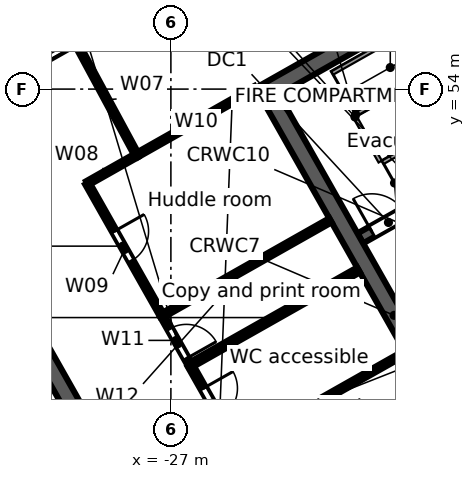
"""IFC4 building model, lengths in metres.
Left out: names, types, materials, properties, quantities, classifications, styles, units other than length and angle.
Written with IfcOpenShell. Run it as: python <this file> out.ifc"""

import sys

from ifc_helpers import new_model, si_unit, direction, frame, frame_2d, origin, place, context, subcontext, project, spatial, rectangle, extrude, element, fill, save


model = new_model("IFC4")
c1 = context("Model", 3, precision=1e-05, world=origin(), true_north=direction((0.0, 1.0)))
c2 = subcontext(c1, "Body", "Model", "MODEL_VIEW")
j1 = project(units=[si_unit("LENGTHUNIT", "METRE"), si_unit("PLANEANGLEUNIT", "RADIAN")], contexts=[c1])
p1 = place(None, origin())
s1 = spatial("IfcSite", under=j1, at=p1, CompositionType="ELEMENT")
p2 = place(p1, origin())
s2 = spatial("IfcBuilding", under=s1, at=p2, CompositionType="ELEMENT")
p3 = place(p2, frame((0.0, 0.0, 223.1)))
s3 = spatial("IfcBuildingStorey", under=s2, at=p3, CompositionType="ELEMENT", Elevation=223.1)
p4 = place(p3, frame((-0.046, 47.974, 0.0), z_axis=(0.0, 0.0, 1.0), x_axis=(-0.870356579543, -0.492421998337, 0.0)))
e1 = element("IfcWall", 1, at=p4, inside=s3, PredefinedType="STANDARD", context=c2, shape_type="SweptSolid", body=[
    extrude(rectangle(XDim=43.754, YDim=0.25, at=frame_2d((21.877, 0.0))), origin(), (0.0, 0.0, 1.0), 3.62),
])
p5 = place(p4, frame((41.061, 0.0, 0.8)))
e2 = element("IfcOpeningElement", 2, at=p5, cuts=e1, PredefinedType="OPENING", context=c2, shape_type="SweptSolid", body=[
    extrude(rectangle(XDim=2.4, YDim=2.2, at=frame_2d((1.2, 1.1))), frame((0.0, 0.135, 0.0), z_axis=(0.0, -1.0, 0.0), x_axis=(1.0, 0.0, 0.0)), (0.0, 0.0, 1.0), 0.27),
])
p6 = place(p4, frame((38.443, 0.0, 0.0)))
e3 = element("IfcOpeningElement", 3, at=p6, cuts=e1, PredefinedType="OPENING", context=c2, shape_type="SweptSolid", body=[
    extrude(rectangle(XDim=1.8, YDim=2.4, at=frame_2d((0.9, 1.2))), frame((0.0, 0.135, 0.0), z_axis=(0.0, -1.0, 0.0), x_axis=(1.0, 0.0, 0.0)), (0.0, 0.0, 1.0), 0.27),
])
p7 = place(p4, frame((35.225, 0.0, 0.8)))
e4 = element("IfcOpeningElement", 4, at=p7, cuts=e1, PredefinedType="OPENING", context=c2, shape_type="SweptSolid", body=[
    extrude(rectangle(XDim=2.4, YDim=2.2, at=frame_2d((1.2, 1.1))), frame((0.0, 0.135, 0.0), z_axis=(0.0, -1.0, 0.0), x_axis=(1.0, 0.0, 0.0)), (0.0, 0.0, 1.0), 0.27),
])
p8 = place(p4, frame((32.307, 0.0, 0.8)))
e5 = element("IfcOpeningElement", 5, at=p8, cuts=e1, PredefinedType="OPENING", context=c2, shape_type="SweptSolid", body=[
    extrude(rectangle(XDim=2.4, YDim=2.2, at=frame_2d((1.2, 1.1))), frame((0.0, 0.135, 0.0), z_axis=(0.0, -1.0, 0.0), x_axis=(1.0, 0.0, 0.0)), (0.0, 0.0, 1.0), 0.27),
])
p9 = place(p4, frame((29.688, 0.0, 0.0)))
e6 = element("IfcOpeningElement", 6, at=p9, cuts=e1, PredefinedType="OPENING", context=c2, shape_type="SweptSolid", body=[
    extrude(rectangle(XDim=1.8, YDim=2.4, at=frame_2d((0.9, 1.2))), frame((0.0, 0.135, 0.0), z_axis=(0.0, -1.0, 0.0), x_axis=(1.0, 0.0, 0.0)), (0.0, 0.0, 1.0), 0.27),
])
p10 = place(p4, frame((26.47, 0.0, 0.8)))
e7 = element("IfcOpeningElement", 7, at=p10, cuts=e1, PredefinedType="OPENING", context=c2, shape_type="SweptSolid", body=[
    extrude(rectangle(XDim=2.4, YDim=2.2, at=frame_2d((1.2, 1.1))), frame((0.0, 0.135, 0.0), z_axis=(0.0, -1.0, 0.0), x_axis=(1.0, 0.0, 0.0)), (0.0, 0.0, 1.0), 0.27),
])
p11 = place(p4, frame((23.552, 0.0, 0.8)))
e8 = element("IfcOpeningElement", 8, at=p11, cuts=e1, PredefinedType="OPENING", context=c2, shape_type="SweptSolid", body=[
    extrude(rectangle(XDim=2.4, YDim=2.2, at=frame_2d((1.2, 1.1))), frame((0.0, 0.135, 0.0), z_axis=(0.0, -1.0, 0.0), x_axis=(1.0, 0.0, 0.0)), (0.0, 0.0, 1.0), 0.27),
])
p12 = place(p4, frame((20.934, 0.0, 0.0)))
e9 = element("IfcOpeningElement", 9, at=p12, cuts=e1, PredefinedType="OPENING", context=c2, shape_type="SweptSolid", body=[
    extrude(rectangle(XDim=1.8, YDim=2.4, at=frame_2d((0.9, 1.2))), frame((0.0, 0.135, 0.0), z_axis=(0.0, -1.0, 0.0), x_axis=(1.0, 0.0, 0.0)), (0.0, 0.0, 1.0), 0.27),
])
p13 = place(p4, frame((17.716, 0.0, 0.8)))
e10 = element("IfcOpeningElement", 10, at=p13, cuts=e1, PredefinedType="OPENING", context=c2, shape_type="SweptSolid", body=[
    extrude(rectangle(XDim=2.4, YDim=2.2, at=frame_2d((1.2, 1.1))), frame((0.0, 0.135, 0.0), z_axis=(0.0, -1.0, 0.0), x_axis=(1.0, 0.0, 0.0)), (0.0, 0.0, 1.0), 0.27),
])
p14 = place(p4, frame((14.798, 0.0, 0.8)))
e11 = element("IfcOpeningElement", 11, at=p14, cuts=e1, PredefinedType="OPENING", context=c2, shape_type="SweptSolid", body=[
    extrude(rectangle(XDim=2.4, YDim=2.2, at=frame_2d((1.2, 1.1))), frame((0.0, 0.135, 0.0), z_axis=(0.0, -1.0, 0.0), x_axis=(1.0, 0.0, 0.0)), (0.0, 0.0, 1.0), 0.27),
])
p15 = place(p4, frame((12.179, 0.0, 0.0)))
e12 = element("IfcOpeningElement", 12, at=p15, cuts=e1, PredefinedType="OPENING", context=c2, shape_type="SweptSolid", body=[
    extrude(rectangle(XDim=1.8, YDim=2.4, at=frame_2d((0.9, 1.2))), frame((0.0, 0.135, 0.0), z_axis=(0.0, -1.0, 0.0), x_axis=(1.0, 0.0, 0.0)), (0.0, 0.0, 1.0), 0.27),
])
p16 = place(p4, frame((8.961, 0.0, 0.8)))
e13 = element("IfcOpeningElement", 13, at=p16, cuts=e1, PredefinedType="OPENING", context=c2, shape_type="SweptSolid", body=[
    extrude(rectangle(XDim=2.4, YDim=2.2, at=frame_2d((1.2, 1.1))), frame((0.0, 0.135, 0.0), z_axis=(0.0, -1.0, 0.0), x_axis=(1.0, 0.0, 0.0)), (0.0, 0.0, 1.0), 0.27),
])
p17 = place(p4, frame((6.043, 0.0, 0.8)))
e14 = element("IfcOpeningElement", 14, at=p17, cuts=e1, PredefinedType="OPENING", context=c2, shape_type="SweptSolid", body=[
    extrude(rectangle(XDim=2.4, YDim=2.2, at=frame_2d((1.2, 1.1))), frame((0.0, 0.135, 0.0), z_axis=(0.0, -1.0, 0.0), x_axis=(1.0, 0.0, 0.0)), (0.0, 0.0, 1.0), 0.27),
])
p18 = place(p4, frame((3.425, 0.0, 0.0)))
e15 = element("IfcOpeningElement", 15, at=p18, cuts=e1, PredefinedType="OPENING", context=c2, shape_type="SweptSolid", body=[
    extrude(rectangle(XDim=1.8, YDim=2.4, at=frame_2d((0.9, 1.2))), frame((0.0, 0.135, 0.0), z_axis=(0.0, -1.0, 0.0), x_axis=(1.0, 0.0, 0.0)), (0.0, 0.0, 1.0), 0.27),
])
p19 = place(p4, frame((0.207, 0.0, 0.8)))
e16 = element("IfcOpeningElement", 16, at=p19, cuts=e1, PredefinedType="OPENING", context=c2, shape_type="SweptSolid", body=[
    extrude(rectangle(XDim=2.4, YDim=2.2, at=frame_2d((1.2, 1.1))), frame((0.0, 0.135, 0.0), z_axis=(0.0, -1.0, 0.0), x_axis=(1.0, 0.0, 0.0)), (0.0, 0.0, 1.0), 0.27),
])
p20 = place(p3, frame((-58.732, 38.771, 0.0), z_axis=(0.0, 0.0, 1.0), x_axis=(0.870354824205, 0.492425100887, 0.0)))
e17 = element("IfcWall", 17, at=p20, inside=s3, PredefinedType="STANDARD", context=c2, shape_type="SweptSolid", body=[
    extrude(rectangle(XDim=64.006, YDim=0.25, at=frame_2d((32.003, 0.0))), origin(), (0.0, 0.0, 1.0), 3.62),
])
p21 = place(p20, frame((61.259, 0.0, 0.8)))
e18 = element("IfcOpeningElement", 18, at=p21, cuts=e17, PredefinedType="OPENING", context=c2, shape_type="SweptSolid", body=[
    extrude(rectangle(XDim=2.4, YDim=2.2, at=frame_2d((1.2, 1.1))), frame((0.0, 0.135, 0.0), z_axis=(0.0, -1.0, 0.0), x_axis=(1.0, 0.0, 0.0)), (0.0, 0.0, 1.0), 0.27),
])
p22 = place(p20, frame((58.216, 0.0, 0.8)))
e19 = element("IfcOpeningElement", 19, at=p22, cuts=e17, PredefinedType="OPENING", context=c2, shape_type="SweptSolid", body=[
    extrude(rectangle(XDim=2.4, YDim=2.2, at=frame_2d((1.2, 1.1))), frame((0.0, 0.135, 0.0), z_axis=(0.0, -1.0, 0.0), x_axis=(1.0, 0.0, 0.0)), (0.0, 0.0, 1.0), 0.27),
])
p23 = place(p20, frame((55.173, 0.0, 0.8)))
e20 = element("IfcOpeningElement", 20, at=p23, cuts=e17, PredefinedType="OPENING", context=c2, shape_type="SweptSolid", body=[
    extrude(rectangle(XDim=2.4, YDim=2.2, at=frame_2d((1.2, 1.1))), frame((0.0, 0.135, 0.0), z_axis=(0.0, -1.0, 0.0), x_axis=(1.0, 0.0, 0.0)), (0.0, 0.0, 1.0), 0.27),
])
p24 = place(p20, frame((52.129, 0.0, 0.8)))
e21 = element("IfcOpeningElement", 21, at=p24, cuts=e17, PredefinedType="OPENING", context=c2, shape_type="SweptSolid", body=[
    extrude(rectangle(XDim=2.4, YDim=2.2, at=frame_2d((1.2, 1.1))), frame((0.0, 0.135, 0.0), z_axis=(0.0, -1.0, 0.0), x_axis=(1.0, 0.0, 0.0)), (0.0, 0.0, 1.0), 0.27),
])
p25 = place(p20, frame((49.086, 0.0, 0.8)))
e22 = element("IfcOpeningElement", 22, at=p25, cuts=e17, PredefinedType="OPENING", context=c2, shape_type="SweptSolid", body=[
    extrude(rectangle(XDim=2.4, YDim=2.2, at=frame_2d((1.2, 1.1))), frame((0.0, 0.135, 0.0), z_axis=(0.0, -1.0, 0.0), x_axis=(1.0, 0.0, 0.0)), (0.0, 0.0, 1.0), 0.27),
])
p26 = place(p20, frame((46.043, 0.0, 0.8)))
e23 = element("IfcOpeningElement", 23, at=p26, cuts=e17, PredefinedType="OPENING", context=c2, shape_type="SweptSolid", body=[
    extrude(rectangle(XDim=2.4, YDim=2.2, at=frame_2d((1.2, 1.1))), frame((0.0, 0.135, 0.0), z_axis=(0.0, -1.0, 0.0), x_axis=(1.0, 0.0, 0.0)), (0.0, 0.0, 1.0), 0.27),
])
p27 = place(p20, frame((43.0, 0.0, 0.8)))
e24 = element("IfcOpeningElement", 24, at=p27, cuts=e17, PredefinedType="OPENING", context=c2, shape_type="SweptSolid", body=[
    extrude(rectangle(XDim=2.4, YDim=2.2, at=frame_2d((1.2, 1.1))), frame((0.0, 0.135, 0.0), z_axis=(0.0, -1.0, 0.0), x_axis=(1.0, 0.0, 0.0)), (0.0, 0.0, 1.0), 0.27),
])
p28 = place(p20, frame((39.956, 0.0, 0.8)))
e25 = element("IfcOpeningElement", 25, at=p28, cuts=e17, PredefinedType="OPENING", context=c2, shape_type="SweptSolid", body=[
    extrude(rectangle(XDim=2.4, YDim=2.2, at=frame_2d((1.2, 1.1))), frame((0.0, 0.135, 0.0), z_axis=(0.0, -1.0, 0.0), x_axis=(1.0, 0.0, 0.0)), (0.0, 0.0, 1.0), 0.27),
])
p29 = place(p20, frame((36.913, 0.0, 0.8)))
e26 = element("IfcOpeningElement", 26, at=p29, cuts=e17, PredefinedType="OPENING", context=c2, shape_type="SweptSolid", body=[
    extrude(rectangle(XDim=2.4, YDim=2.2, at=frame_2d((1.2, 1.1))), frame((0.0, 0.135, 0.0), z_axis=(0.0, -1.0, 0.0), x_axis=(1.0, 0.0, 0.0)), (0.0, 0.0, 1.0), 0.27),
])
p30 = place(p20, frame((33.87, 0.0, 0.8)))
e27 = element("IfcOpeningElement", 27, at=p30, cuts=e17, PredefinedType="OPENING", context=c2, shape_type="SweptSolid", body=[
    extrude(rectangle(XDim=2.4, YDim=2.2, at=frame_2d((1.2, 1.1))), frame((0.0, 0.135, 0.0), z_axis=(0.0, -1.0, 0.0), x_axis=(1.0, 0.0, 0.0)), (0.0, 0.0, 1.0), 0.27),
])
p31 = place(p20, frame((30.826, 0.0, 0.8)))
e28 = element("IfcOpeningElement", 28, at=p31, cuts=e17, PredefinedType="OPENING", context=c2, shape_type="SweptSolid", body=[
    extrude(rectangle(XDim=2.4, YDim=2.2, at=frame_2d((1.2, 1.1))), frame((0.0, 0.135, 0.0), z_axis=(0.0, -1.0, 0.0), x_axis=(1.0, 0.0, 0.0)), (0.0, 0.0, 1.0), 0.27),
])
p32 = place(p20, frame((27.783, 0.0, 0.8)))
e29 = element("IfcOpeningElement", 29, at=p32, cuts=e17, PredefinedType="OPENING", context=c2, shape_type="SweptSolid", body=[
    extrude(rectangle(XDim=2.4, YDim=2.2, at=frame_2d((1.2, 1.1))), frame((0.0, 0.135, 0.0), z_axis=(0.0, -1.0, 0.0), x_axis=(1.0, 0.0, 0.0)), (0.0, 0.0, 1.0), 0.27),
])
p33 = place(p20, frame((24.74, 0.0, 0.8)))
e30 = element("IfcOpeningElement", 30, at=p33, cuts=e17, PredefinedType="OPENING", context=c2, shape_type="SweptSolid", body=[
    extrude(rectangle(XDim=2.4, YDim=2.2, at=frame_2d((1.2, 1.1))), frame((0.0, 0.135, 0.0), z_axis=(0.0, -1.0, 0.0), x_axis=(1.0, 0.0, 0.0)), (0.0, 0.0, 1.0), 0.27),
])
p34 = place(p20, frame((21.696, 0.0, 0.8)))
e31 = element("IfcOpeningElement", 31, at=p34, cuts=e17, PredefinedType="OPENING", context=c2, shape_type="SweptSolid", body=[
    extrude(rectangle(XDim=2.4, YDim=2.2, at=frame_2d((1.2, 1.1))), frame((0.0, 0.135, 0.0), z_axis=(0.0, -1.0, 0.0), x_axis=(1.0, 0.0, 0.0)), (0.0, 0.0, 1.0), 0.27),
])
p35 = place(p20, frame((18.653, 0.0, 0.8)))
e32 = element("IfcOpeningElement", 32, at=p35, cuts=e17, PredefinedType="OPENING", context=c2, shape_type="SweptSolid", body=[
    extrude(rectangle(XDim=2.4, YDim=2.2, at=frame_2d((1.2, 1.1))), frame((0.0, 0.135, 0.0), z_axis=(0.0, -1.0, 0.0), x_axis=(1.0, 0.0, 0.0)), (0.0, 0.0, 1.0), 0.27),
])
p36 = place(p20, frame((15.61, 0.0, 0.8)))
e33 = element("IfcOpeningElement", 33, at=p36, cuts=e17, PredefinedType="OPENING", context=c2, shape_type="SweptSolid", body=[
    extrude(rectangle(XDim=2.4, YDim=2.2, at=frame_2d((1.2, 1.1))), frame((0.0, 0.135, 0.0), z_axis=(0.0, -1.0, 0.0), x_axis=(1.0, 0.0, 0.0)), (0.0, 0.0, 1.0), 0.27),
])
p37 = place(p20, frame((12.567, 0.0, 0.8)))
e34 = element("IfcOpeningElement", 34, at=p37, cuts=e17, PredefinedType="OPENING", context=c2, shape_type="SweptSolid", body=[
    extrude(rectangle(XDim=2.4, YDim=2.2, at=frame_2d((1.2, 1.1))), frame((0.0, 0.135, 0.0), z_axis=(0.0, -1.0, 0.0), x_axis=(1.0, 0.0, 0.0)), (0.0, 0.0, 1.0), 0.27),
])
p38 = place(p20, frame((9.523, 0.0, 0.8)))
e35 = element("IfcOpeningElement", 35, at=p38, cuts=e17, PredefinedType="OPENING", context=c2, shape_type="SweptSolid", body=[
    extrude(rectangle(XDim=2.4, YDim=2.2, at=frame_2d((1.2, 1.1))), frame((0.0, 0.135, 0.0), z_axis=(0.0, -1.0, 0.0), x_axis=(1.0, 0.0, 0.0)), (0.0, 0.0, 1.0), 0.27),
])
p39 = place(p20, frame((6.48, 0.0, 0.8)))
e36 = element("IfcOpeningElement", 36, at=p39, cuts=e17, PredefinedType="OPENING", context=c2, shape_type="SweptSolid", body=[
    extrude(rectangle(XDim=2.4, YDim=2.2, at=frame_2d((1.2, 1.1))), frame((0.0, 0.135, 0.0), z_axis=(0.0, -1.0, 0.0), x_axis=(1.0, 0.0, 0.0)), (0.0, 0.0, 1.0), 0.27),
])
p40 = place(p20, frame((3.437, 0.0, 0.8)))
e37 = element("IfcOpeningElement", 37, at=p40, cuts=e17, PredefinedType="OPENING", context=c2, shape_type="SweptSolid", body=[
    extrude(rectangle(XDim=2.4, YDim=2.2, at=frame_2d((1.2, 1.1))), frame((0.0, 0.135, 0.0), z_axis=(0.0, -1.0, 0.0), x_axis=(1.0, 0.0, 0.0)), (0.0, 0.0, 1.0), 0.27),
])
p41 = place(p20, frame((0.393, 0.0, 0.8)))
e38 = element("IfcOpeningElement", 38, at=p41, cuts=e17, PredefinedType="OPENING", context=c2, shape_type="SweptSolid", body=[
    extrude(rectangle(XDim=2.4, YDim=2.2, at=frame_2d((1.2, 1.1))), frame((0.0, 0.135, 0.0), z_axis=(0.0, -1.0, 0.0), x_axis=(1.0, 0.0, 0.0)), (0.0, 0.0, 1.0), 0.27),
])
p42 = place(p3, frame((-31.787, 49.542, 0.0), z_axis=(0.0, 0.0, 1.0), x_axis=(0.492421378713, -0.870356930107, 0.0)))
e39 = element("IfcWall", 39, at=p42, inside=s3, PredefinedType="SOLIDWALL", context=c2, shape_type="SweptSolid", body=[
    extrude(rectangle(XDim=13.1, YDim=0.45, at=frame_2d((6.55, 0.0))), origin(), (0.0, 0.0, 1.0), 3.62),
])
p43 = place(p3, frame((-22.015, 50.072, 0.0), z_axis=(0.0, 0.0, 1.0), x_axis=(0.870354900257, 0.492424966466, 0.0)))
e40 = element("IfcWall", 40, at=p43, inside=s3, PredefinedType="SOLIDWALL", context=c2, shape_type="SweptSolid", body=[
    extrude(rectangle(XDim=7.35, YDim=0.3, at=frame_2d((3.675, 0.0))), origin(), (0.0, 0.0, 1.0), 3.62),
])
p44 = place(p43, frame((0.35, 0.0, 0.0)))
e41 = element("IfcOpeningElement", 41, at=p44, cuts=e40, PredefinedType="OPENING", context=c2, shape_type="SweptSolid", body=[
    extrude(rectangle(XDim=1.0, YDim=2.1, at=frame_2d((0.5, 1.05))), frame((0.0, 0.16, 0.0), z_axis=(0.0, -1.0, 0.0), x_axis=(1.0, 0.0, 0.0)), (0.0, 0.0, 1.0), 0.32),
])
p45 = place(p3, frame((-24.66, 53.832, 0.0), z_axis=(0.0, 0.0, 1.0), x_axis=(0.870353598469, 0.492427267353, 0.0)))
e42 = element("IfcWall", 42, at=p45, inside=s3, PredefinedType="SOLIDWALL", context=c2, shape_type="SweptSolid", body=[
    extrude(rectangle(XDim=15.0, YDim=0.45, at=frame_2d((7.5, 0.0))), origin(), (0.0, 0.0, 1.0), 3.62),
])
p46 = place(p3, frame((-24.353, 53.747, 0.0), z_axis=(0.0, 0.0, 1.0), x_axis=(0.492435496286, -0.870348942665, 0.0)))
e43 = element("IfcWall", 43, at=p46, inside=s3, PredefinedType="SOLIDWALL", context=c2, shape_type="SweptSolid", body=[
    extrude(rectangle(XDim=13.1, YDim=0.45, at=frame_2d((6.55, 0.0))), origin(), (0.0, 0.0, 1.0), 3.62),
])
p47 = place(p3, frame((-29.474, 55.181, 0.0), z_axis=(0.0, 0.0, 1.0), x_axis=(0.475344759365, -0.879799613403, 0.0)))
e44 = element("IfcWall", 44, at=p47, inside=s3, PredefinedType="PARTITIONING", context=c2, shape_type="SweptSolid", body=[
    extrude(rectangle(XDim=3.32, YDim=0.125, at=frame_2d((1.66, 0.0))), origin(), (0.0, 0.0, 1.0), 2.988),
])
p48 = place(p3, frame((-29.201, 51.521, 0.0), z_axis=(0.0, 0.0, 1.0), x_axis=(0.870150176056, 0.492786638526, 0.0)))
e45 = element("IfcWall", 45, at=p48, inside=s3, PredefinedType="PARTITIONING", context=c2, shape_type="SweptSolid", body=[
    extrude(rectangle(XDim=1.5, YDim=0.125, at=frame_2d((0.75, 0.0))), origin(), (0.0, 0.0, 1.0), 3.62),
])
p49 = place(p3, frame((-29.201, 51.521, 0.0), z_axis=(0.0, 0.0, 1.0), x_axis=(0.492340861121, -0.870402479587, 0.0)))
e46 = element("IfcWall", 46, at=p49, inside=s3, PredefinedType="PARTITIONING", context=c2, shape_type="SweptSolid", body=[
    extrude(rectangle(XDim=3.999, YDim=0.125, at=frame_2d((2.0, 0.0))), origin(), (0.0, 0.0, 1.0), 3.62),
])
p50 = place(p49, frame((1.45, 0.0, 0.0)))
e47 = element("IfcOpeningElement", 47, at=p50, cuts=e46, PredefinedType="OPENING", context=c2, shape_type="SweptSolid", body=[
    extrude(rectangle(XDim=0.9, YDim=2.1, at=frame_2d((0.45, 1.05))), frame((0.0, 0.073, 0.0), z_axis=(0.0, -1.0, 0.0), x_axis=(1.0, 0.0, 0.0)), (0.0, 0.0, 1.0), 0.145),
])
p51 = place(p3, frame((-27.896, 52.26, 0.0), z_axis=(0.0, 0.0, 1.0), x_axis=(0.870352535776, 0.492429145632, 0.0)))
e48 = element("IfcWall", 48, at=p51, inside=s3, PredefinedType="PARTITIONING", context=c2, shape_type="SweptSolid", body=[
    extrude(rectangle(XDim=3.591, YDim=0.125, at=frame_2d((1.795, 0.0))), origin(), (0.0, 0.0, 1.0), 2.892),
])
p52 = place(p3, frame((-27.232, 48.04, 0.0), z_axis=(0.0, 0.0, 1.0), x_axis=(0.492437810475, -0.870347633314, 0.0)))
e49 = element("IfcWall", 49, at=p52, inside=s3, PredefinedType="PARTITIONING", context=c2, shape_type="SweptSolid", body=[
    extrude(rectangle(XDim=1.501, YDim=0.125, at=frame_2d((0.75, 0.0))), origin(), (0.0, 0.0, 1.0), 3.62),
])
p53 = place(p52, frame((0.4, 0.0, 0.0)))
e50 = element("IfcOpeningElement", 50, at=p53, cuts=e49, PredefinedType="OPENING", context=c2, shape_type="SweptSolid", body=[
    extrude(rectangle(XDim=0.9, YDim=2.1, at=frame_2d((0.45, 1.05))), frame((0.0, 0.073, 0.0), z_axis=(0.0, -1.0, 0.0), x_axis=(1.0, 0.0, 0.0)), (0.0, 0.0, 1.0), 0.145),
])
p54 = place(p3, frame((-27.232, 48.04, 0.0), z_axis=(0.0, 0.0, 1.0), x_axis=(0.870339461844, 0.492452252668, 0.0)))
e51 = element("IfcWall", 51, at=p54, inside=s3, PredefinedType="PARTITIONING", context=c2, shape_type="SweptSolid", body=[
    extrude(rectangle(XDim=5.091, YDim=0.125, at=frame_2d((2.545, 0.0))), origin(), (0.0, 0.0, 1.0), 2.892),
])
p55 = place(p3, frame((-26.493, 46.734, 0.0), z_axis=(0.0, 0.0, 1.0), x_axis=(0.49257867544, -0.870267917656, 0.0)))
e52 = element("IfcWall", 52, at=p55, inside=s3, PredefinedType="PARTITIONING", context=c2, shape_type="SweptSolid", body=[
    extrude(rectangle(XDim=2.499, YDim=0.15, at=frame_2d((1.25, 0.0))), origin(), (0.0, 0.0, 1.0), 2.892),
])
p56 = place(p55, frame((0.7, 0.0, 0.0)))
e53 = element("IfcOpeningElement", 53, at=p56, cuts=e52, PredefinedType="OPENING", context=c2, shape_type="SweptSolid", body=[
    extrude(rectangle(XDim=0.9, YDim=2.1, at=frame_2d((0.45, 1.05))), frame((0.0, 0.085, 0.0), z_axis=(0.0, -1.0, 0.0), x_axis=(1.0, 0.0, 0.0)), (0.0, 0.0, 1.0), 0.17),
])
p57 = place(p3, frame((-26.493, 46.734, 0.0), z_axis=(0.0, 0.0, 1.0), x_axis=(0.870339461844, 0.492452252668, 0.0)))
e54 = element("IfcWall", 54, at=p57, inside=s3, PredefinedType="PARTITIONING", context=c2, shape_type="SweptSolid", body=[
    extrude(rectangle(XDim=5.091, YDim=0.15, at=frame_2d((2.545, 0.0))), origin(), (0.0, 0.0, 1.0), 2.892),
])
p58 = place(p3, frame((-25.262, 44.559, 0.0), z_axis=(0.0, 0.0, 1.0), x_axis=(0.870442223229, 0.492270592276, 0.0)))
e55 = element("IfcWall", 55, at=p58, inside=s3, PredefinedType="PARTITIONING", context=c2, shape_type="SweptSolid", body=[
    extrude(rectangle(XDim=5.09, YDim=0.125, at=frame_2d((2.545, 0.0))), origin(), (0.0, 0.0, 1.0), 3.62),
])
p59 = place(p31, origin())
e56 = element("IfcWindow", 56, at=p59, inside=s3, PartitioningType="SINGLE_PANEL", PredefinedType="WINDOW", context=c2, shape_type="SweptSolid", body=[
    extrude(rectangle(XDim=2.4, YDim=2.2, at=frame_2d((1.2, 1.1))), frame((0.0, 0.03, 0.0), z_axis=(0.0, -1.0, 0.0), x_axis=(1.0, 0.0, 0.0)), (0.0, 0.0, 1.0), 0.06),
])
fill(e28, e56)
p60 = place(p44, origin())
e57 = element("IfcDoor", 57, at=p60, inside=s3, OperationType="SINGLE_SWING_LEFT", PredefinedType="DOOR", context=c2, shape_type="SweptSolid", body=[
    extrude(rectangle(XDim=1.0, YDim=2.1, at=frame_2d((0.5, 1.05))), frame((0.0, 0.025, 0.0), z_axis=(0.0, -1.0, 0.0), x_axis=(1.0, 0.0, 0.0)), (0.0, 0.0, 1.0), 0.05),
])
fill(e41, e57)
p61 = place(p50, origin())
e58 = element("IfcDoor", 58, at=p61, inside=s3, OperationType="SINGLE_SWING_LEFT", PredefinedType="DOOR", context=c2, shape_type="SweptSolid", body=[
    extrude(rectangle(XDim=0.9, YDim=2.1, at=frame_2d((0.45, 1.05))), frame((0.0, 0.025, 0.0), z_axis=(0.0, -1.0, 0.0), x_axis=(1.0, 0.0, 0.0)), (0.0, 0.0, 1.0), 0.05),
])
fill(e47, e58)
p62 = place(p56, origin())
e59 = element("IfcDoor", 59, at=p62, inside=s3, OperationType="SINGLE_SWING_LEFT", PredefinedType="DOOR", context=c2, shape_type="SweptSolid", body=[
    extrude(rectangle(XDim=0.9, YDim=2.1, at=frame_2d((0.45, 1.05))), frame((0.0, 0.025, 0.0), z_axis=(0.0, -1.0, 0.0), x_axis=(1.0, 0.0, 0.0)), (0.0, 0.0, 1.0), 0.05),
])
fill(e53, e59)
p63 = place(p53, origin())
e60 = element("IfcDoor", 60, at=p63, inside=s3, OperationType="SINGLE_SWING_RIGHT", PredefinedType="DOOR", context=c2, shape_type="SweptSolid", body=[
    extrude(rectangle(XDim=0.9, YDim=2.1, at=frame_2d((0.45, 1.05))), frame((0.0, 0.025, 0.0), z_axis=(0.0, -1.0, 0.0), x_axis=(1.0, 0.0, 0.0)), (0.0, 0.0, 1.0), 0.05),
])
fill(e50, e60)
save(model, sys.argv[1])
